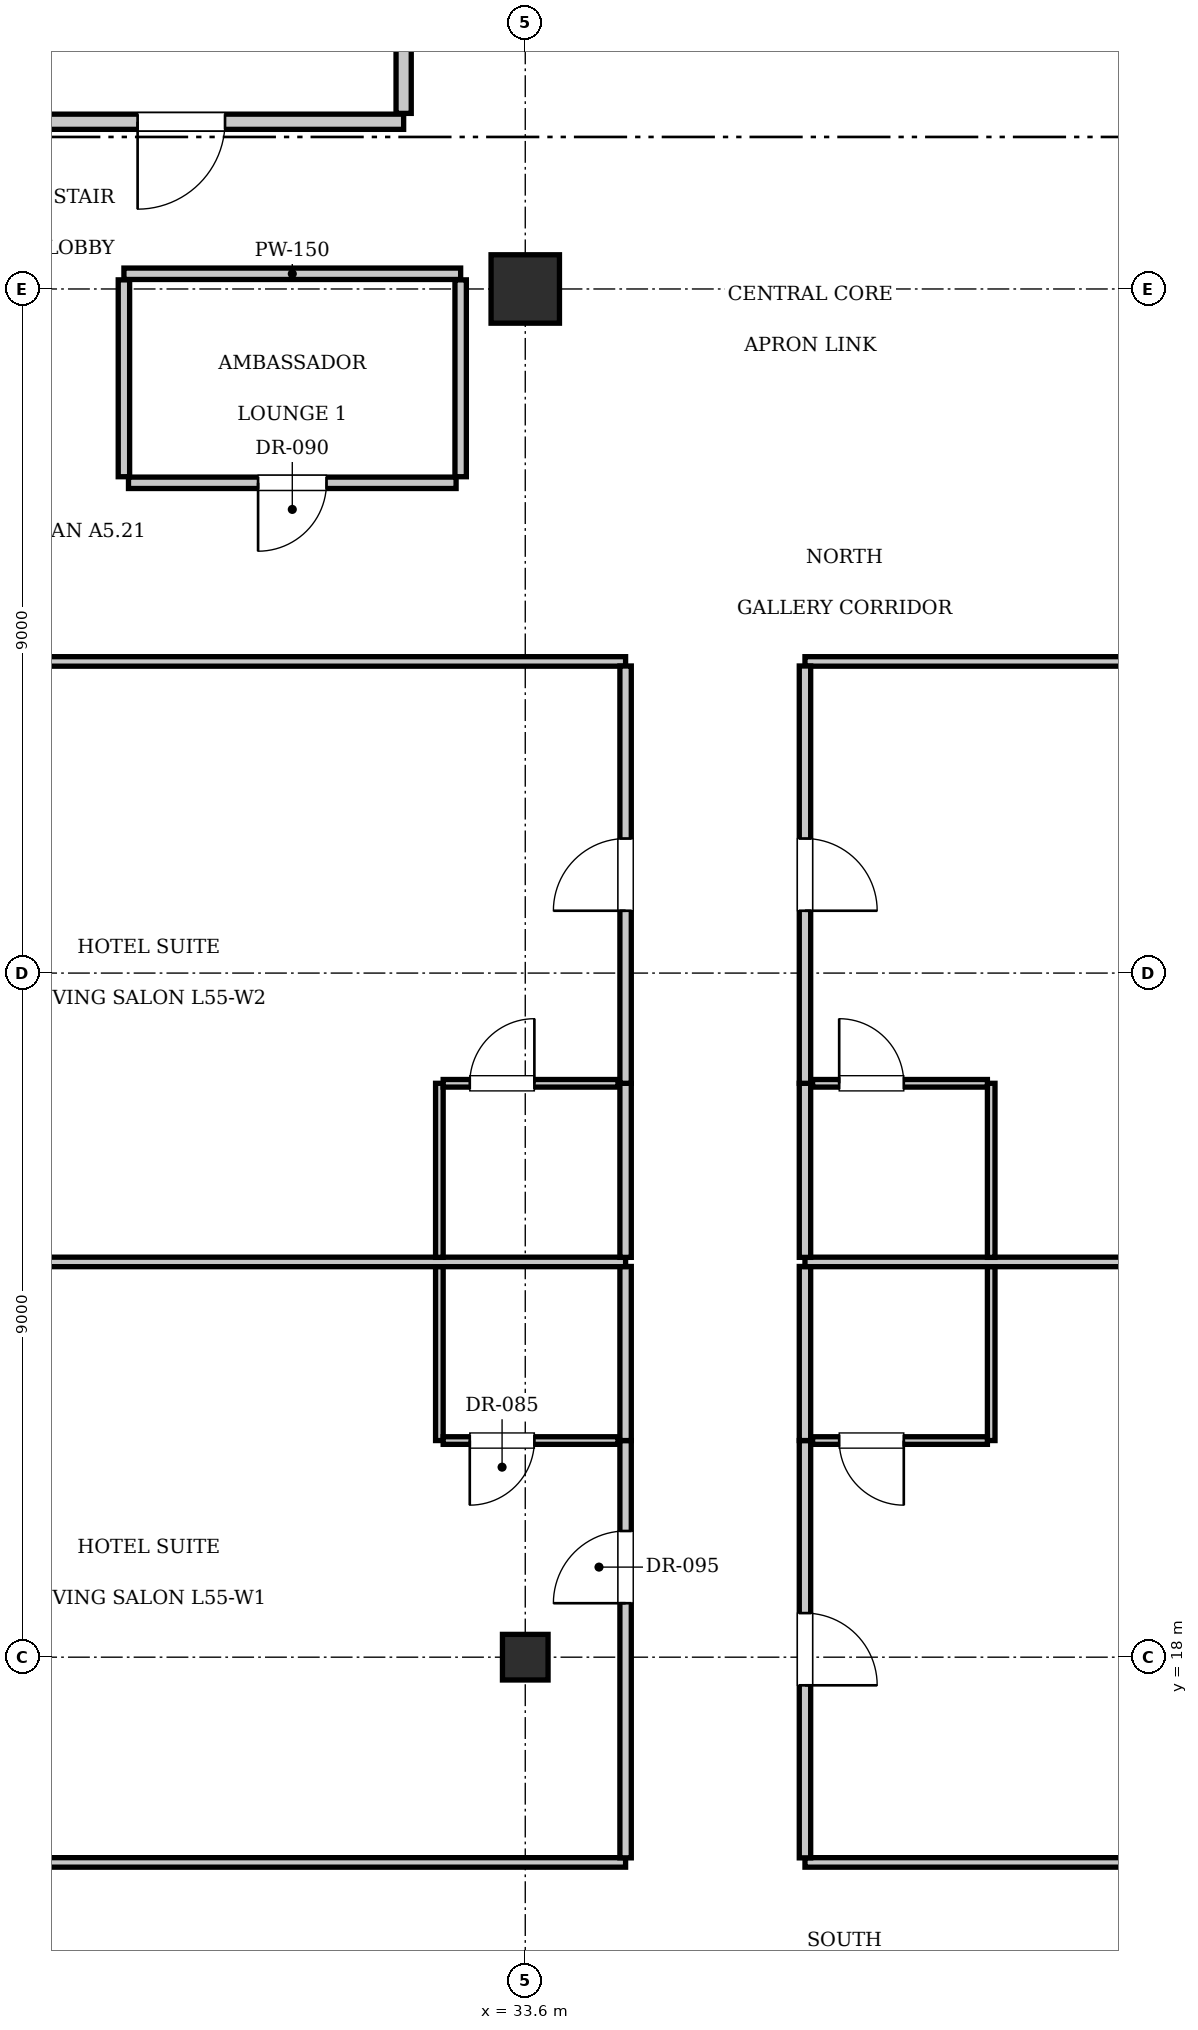
"""IFC4 building model, lengths in metres.
Left out: names, types, materials, properties, quantities, classifications, styles, units other than length and angle.
Written with IfcOpenShell. Run it as: python <this file> out.ifc"""

import sys

from ifc_helpers import new_model, si_unit, direction, frame, frame_2d, origin, origin_2d, place, context, subcontext, project, spatial, rectangle, i_section, extrude, element, fill, save


model = new_model("IFC4")
c1 = context("Model", 3, precision=1e-05, world=origin(), true_north=direction((0.0, 1.0)))
c2 = subcontext(c1, "Body", "Model", "MODEL_VIEW")
j1 = project(units=[si_unit("LENGTHUNIT", "METRE"), si_unit("PLANEANGLEUNIT", "RADIAN")], contexts=[c1])
p1 = place(None, origin())
s1 = spatial("IfcSite", under=j1, at=p1, CompositionType="ELEMENT")
p2 = place(p1, origin())
s2 = spatial("IfcBuilding", under=s1, at=p2, CompositionType="ELEMENT")
p3 = place(p2, frame((0.0, 0.0, 223.65)))
s3 = spatial("IfcBuildingStorey", under=s2, at=p3, CompositionType="ELEMENT", Elevation=223.65)
p4 = place(p3, frame((33.6, 36.0, 0.0), z_axis=(0.0, 0.0, 1.0), x_axis=(1.0, 0.0, 0.0)))
e1 = element("IfcColumn", 1, at=p4, inside=s3, PredefinedType="COLUMN", context=c2, shape_type="SweptSolid", body=[
    extrude(rectangle(XDim=0.9, YDim=0.9, at=origin_2d()), origin(), (0.0, 0.0, 1.0), 3.85),
])
p5 = place(p3, frame((33.6, 18.0, 0.0), z_axis=(0.0, 0.0, 1.0), x_axis=(1.0, 0.0, 0.0)))
e2 = element("IfcColumn", 2, at=p5, inside=s3, PredefinedType="COLUMN", context=c2, shape_type="SweptSolid", body=[
    extrude(i_section(OverallWidth=0.6, OverallDepth=0.6, WebThickness=0.025, FlangeThickness=0.038, at=origin_2d()), origin(), (0.0, 0.0, 1.0), 3.85),
])
p6 = place(p3, frame((26.2, 38.2, 0.0), z_axis=(0.0, 0.0, 1.0), x_axis=(1.0, 0.0, 0.0)))
e3 = element("IfcWall", 3, at=p6, inside=s3, PredefinedType="PARTITIONING", context=c2, shape_type="SweptSolid", body=[
    extrude(rectangle(XDim=5.8, YDim=0.2, at=frame_2d((2.9, 0.0))), origin(), (0.0, 0.0, 1.0), 3.55),
])
p7 = place(p6, frame((2.3, 0.0, 0.0)))
e4 = element("IfcOpeningElement", 4, at=p7, cuts=e3, PredefinedType="OPENING", context=c2, shape_type="SweptSolid", body=[
    extrude(rectangle(XDim=1.15, YDim=2.15, at=frame_2d((0.575, 1.075))), frame((0.0, 0.11, 0.0), z_axis=(0.0, -1.0, 0.0), x_axis=(1.0, 0.0, 0.0)), (0.0, 0.0, 1.0), 0.22),
])
p8 = place(p3, frame((32.0, 38.31, 0.0), z_axis=(0.0, 0.0, 1.0), x_axis=(0.0, 1.0, 0.0)))
e5 = element("IfcWall", 5, at=p8, inside=s3, PredefinedType="PARTITIONING", context=c2, shape_type="SweptSolid", body=[
    extrude(rectangle(XDim=3.07, YDim=0.2, at=frame_2d((1.535, 0.0))), origin(), (0.0, 0.0, 1.0), 3.55),
])
p9 = place(p3, frame((28.32, 36.2, 0.0), z_axis=(0.0, 0.0, 1.0), x_axis=(1.0, 0.0, 0.0)))
e6 = element("IfcWall", 6, at=p9, inside=s3, PredefinedType="PARTITIONING", context=c2, shape_type="SweptSolid", body=[
    extrude(rectangle(XDim=4.43, YDim=0.15, at=frame_2d((2.215, 0.0))), origin(), (0.0, 0.0, 1.0), 3.55),
])
for number, where, z_axis, x_axis in (
    (7, (28.32, 33.53, 0.0), (0.0, 0.0, 1.0), (0.0, 1.0, 0.0)),
    (8, (32.75, 33.53, 0.0), (0.0, 0.0, 1.0), (0.0, 1.0, 0.0)),
):
    element("IfcWall", number, at=place(p3, frame(where, z_axis=z_axis, x_axis=x_axis)), inside=s3, PredefinedType="PARTITIONING", context=c2, shape_type="SweptSolid", body=[
        extrude(rectangle(XDim=2.59, YDim=0.15, at=frame_2d((1.295, 0.0))), origin(), (0.0, 0.0, 1.0), 3.55),
    ])
p10 = place(p3, frame((28.38, 33.45, 0.0), z_axis=(0.0, 0.0, 1.0), x_axis=(1.0, 0.0, 0.0)))
e9 = element("IfcWall", 9, at=p10, inside=s3, PredefinedType="PARTITIONING", context=c2, shape_type="SweptSolid", body=[
    extrude(rectangle(XDim=4.31, YDim=0.15, at=frame_2d((2.155, 0.0))), origin(), (0.0, 0.0, 1.0), 3.55),
])
p11 = place(p10, frame((1.705, 0.0, 0.0)))
e10 = element("IfcOpeningElement", 10, at=p11, cuts=e9, PredefinedType="OPENING", context=c2, shape_type="SweptSolid", body=[
    extrude(rectangle(XDim=0.9, YDim=2.1, at=frame_2d((0.45, 1.05))), frame((0.0, 0.085, 0.0), z_axis=(0.0, -1.0, 0.0), x_axis=(1.0, 0.0, 0.0)), (0.0, 0.0, 1.0), 0.17),
])
p12 = place(p3, frame((13.2, 15.3, 0.0), z_axis=(0.0, 0.0, 1.0), x_axis=(1.0, 0.0, 0.0)))
e11 = element("IfcWall", 11, at=p12, inside=s3, PredefinedType="PARTITIONING", context=c2, shape_type="SweptSolid", body=[
    extrude(rectangle(XDim=21.72, YDim=0.125, at=frame_2d((10.86, 0.0))), origin(), (0.0, 0.0, 1.0), 3.55),
])
p13 = place(p3, frame((37.28, 15.3, 0.0), z_axis=(0.0, 0.0, 1.0), x_axis=(1.0, 0.0, 0.0)))
e12 = element("IfcWall", 12, at=p13, inside=s3, PredefinedType="PARTITIONING", context=c2, shape_type="SweptSolid", body=[
    extrude(rectangle(XDim=25.12, YDim=0.125, at=frame_2d((12.56, 0.0))), origin(), (0.0, 0.0, 1.0), 3.55),
])
p14 = place(p3, frame((13.2, 31.1, 0.0), z_axis=(0.0, 0.0, 1.0), x_axis=(1.0, 0.0, 0.0)))
e13 = element("IfcWall", 13, at=p14, inside=s3, PredefinedType="PARTITIONING", context=c2, shape_type="SweptSolid", body=[
    extrude(rectangle(XDim=21.72, YDim=0.125, at=frame_2d((10.86, 0.0))), origin(), (0.0, 0.0, 1.0), 3.55),
])
p15 = place(p3, frame((37.28, 31.1, 0.0), z_axis=(0.0, 0.0, 1.0), x_axis=(1.0, 0.0, 0.0)))
e14 = element("IfcWall", 14, at=p15, inside=s3, PredefinedType="PARTITIONING", context=c2, shape_type="SweptSolid", body=[
    extrude(rectangle(XDim=25.12, YDim=0.125, at=frame_2d((12.56, 0.0))), origin(), (0.0, 0.0, 1.0), 3.55),
])
p16 = place(p3, frame((34.92, 15.36, 0.0), z_axis=(0.0, 0.0, 1.0), x_axis=(0.0, 1.0, 0.0)))
e15 = element("IfcWall", 15, at=p16, inside=s3, PredefinedType="PARTITIONING", context=c2, shape_type="SweptSolid", body=[
    extrude(rectangle(XDim=5.49, YDim=0.15, at=frame_2d((2.745, 0.0))), origin(), (0.0, 0.0, 1.0), 3.55),
])
p17 = place(p16, frame((3.35, 0.0, 0.0)))
e16 = element("IfcOpeningElement", 16, at=p17, cuts=e15, PredefinedType="OPENING", context=c2, shape_type="SweptSolid", body=[
    extrude(rectangle(XDim=0.95, YDim=2.15, at=frame_2d((0.475, 1.075))), frame((0.0, 0.085, 0.0), z_axis=(0.0, -1.0, 0.0), x_axis=(1.0, 0.0, 0.0)), (0.0, 0.0, 1.0), 0.17),
])
p18 = place(p3, frame((34.92, 20.85, 0.0), z_axis=(0.0, 0.0, 1.0), x_axis=(0.0, 1.0, 0.0)))
e17 = element("IfcWall", 17, at=p18, inside=s3, PredefinedType="PARTITIONING", context=c2, shape_type="SweptSolid", body=[
    extrude(rectangle(XDim=2.29, YDim=0.15, at=frame_2d((1.145, 0.0))), origin(), (0.0, 0.0, 1.0), 3.55),
])
p19 = place(p3, frame((32.47, 20.85, 0.0), z_axis=(0.0, 0.0, 1.0), x_axis=(0.0, 1.0, 0.0)))
e18 = element("IfcWall", 18, at=p19, inside=s3, PredefinedType="PARTITIONING", context=c2, shape_type="SweptSolid", body=[
    extrude(rectangle(XDim=2.29, YDim=0.1, at=frame_2d((1.145, 0.0))), origin(), (0.0, 0.0, 1.0), 3.55),
])
p20 = place(p3, frame((32.52, 20.85, 0.0), z_axis=(0.0, 0.0, 1.0), x_axis=(1.0, 0.0, 0.0)))
e19 = element("IfcWall", 19, at=p20, inside=s3, PredefinedType="PARTITIONING", context=c2, shape_type="SweptSolid", body=[
    extrude(rectangle(XDim=2.3, YDim=0.1, at=frame_2d((1.15, 0.0))), origin(), (0.0, 0.0, 1.0), 3.55),
])
p21 = place(p20, frame((0.35, 0.0, 0.0)))
e20 = element("IfcOpeningElement", 20, at=p21, cuts=e19, PredefinedType="OPENING", context=c2, shape_type="SweptSolid", body=[
    extrude(rectangle(XDim=0.85, YDim=2.1, at=frame_2d((0.425, 1.05))), frame((0.0, 0.06, 0.0), z_axis=(0.0, -1.0, 0.0), x_axis=(1.0, 0.0, 0.0)), (0.0, 0.0, 1.0), 0.12),
])
p22 = place(p3, frame((37.28, 15.36, 0.0), z_axis=(0.0, 0.0, 1.0), x_axis=(0.0, 1.0, 0.0)))
e21 = element("IfcWall", 21, at=p22, inside=s3, PredefinedType="PARTITIONING", context=c2, shape_type="SweptSolid", body=[
    extrude(rectangle(XDim=5.49, YDim=0.15, at=frame_2d((2.745, 0.0))), origin(), (0.0, 0.0, 1.0), 3.55),
])
p23 = place(p22, frame((2.27, 0.0, 0.0)))
e22 = element("IfcOpeningElement", 22, at=p23, cuts=e21, PredefinedType="OPENING", context=c2, shape_type="SweptSolid", body=[
    extrude(rectangle(XDim=0.95, YDim=2.15, at=frame_2d((0.475, 1.075))), frame((0.0, 0.085, 0.0), z_axis=(0.0, -1.0, 0.0), x_axis=(1.0, 0.0, 0.0)), (0.0, 0.0, 1.0), 0.17),
])
p24 = place(p3, frame((37.28, 20.85, 0.0), z_axis=(0.0, 0.0, 1.0), x_axis=(0.0, 1.0, 0.0)))
e23 = element("IfcWall", 23, at=p24, inside=s3, PredefinedType="PARTITIONING", context=c2, shape_type="SweptSolid", body=[
    extrude(rectangle(XDim=2.29, YDim=0.15, at=frame_2d((1.145, 0.0))), origin(), (0.0, 0.0, 1.0), 3.55),
])
p25 = place(p3, frame((39.73, 20.85, 0.0), z_axis=(0.0, 0.0, 1.0), x_axis=(0.0, 1.0, 0.0)))
e24 = element("IfcWall", 24, at=p25, inside=s3, PredefinedType="PARTITIONING", context=c2, shape_type="SweptSolid", body=[
    extrude(rectangle(XDim=2.29, YDim=0.1, at=frame_2d((1.145, 0.0))), origin(), (0.0, 0.0, 1.0), 3.55),
])
p26 = place(p3, frame((37.38, 20.85, 0.0), z_axis=(0.0, 0.0, 1.0), x_axis=(1.0, 0.0, 0.0)))
e25 = element("IfcWall", 25, at=p26, inside=s3, PredefinedType="PARTITIONING", context=c2, shape_type="SweptSolid", body=[
    extrude(rectangle(XDim=2.3, YDim=0.1, at=frame_2d((1.15, 0.0))), origin(), (0.0, 0.0, 1.0), 3.55),
])
p27 = place(p26, frame((0.35, 0.0, 0.0)))
e26 = element("IfcOpeningElement", 26, at=p27, cuts=e25, PredefinedType="OPENING", context=c2, shape_type="SweptSolid", body=[
    extrude(rectangle(XDim=0.85, YDim=2.1, at=frame_2d((0.425, 1.05))), frame((0.0, 0.06, 0.0), z_axis=(0.0, -1.0, 0.0), x_axis=(1.0, 0.0, 0.0)), (0.0, 0.0, 1.0), 0.12),
])
p28 = place(p3, frame((13.2, 23.2, 0.0), z_axis=(0.0, 0.0, 1.0), x_axis=(1.0, 0.0, 0.0)))
e27 = element("IfcWall", 27, at=p28, inside=s3, PredefinedType="PARTITIONING", context=c2, shape_type="SweptSolid", body=[
    extrude(rectangle(XDim=21.72, YDim=0.125, at=frame_2d((10.86, 0.0))), origin(), (0.0, 0.0, 1.0), 3.55),
])
p29 = place(p3, frame((37.28, 23.2, 0.0), z_axis=(0.0, 0.0, 1.0), x_axis=(1.0, 0.0, 0.0)))
e28 = element("IfcWall", 28, at=p29, inside=s3, PredefinedType="PARTITIONING", context=c2, shape_type="SweptSolid", body=[
    extrude(rectangle(XDim=25.12, YDim=0.125, at=frame_2d((12.56, 0.0))), origin(), (0.0, 0.0, 1.0), 3.55),
])
p30 = place(p3, frame((34.92, 23.26, 0.0), z_axis=(0.0, 0.0, 1.0), x_axis=(0.0, 1.0, 0.0)))
e29 = element("IfcWall", 29, at=p30, inside=s3, PredefinedType="PARTITIONING", context=c2, shape_type="SweptSolid", body=[
    extrude(rectangle(XDim=2.29, YDim=0.15, at=frame_2d((1.145, 0.0))), origin(), (0.0, 0.0, 1.0), 3.55),
])
p31 = place(p3, frame((34.92, 25.55, 0.0), z_axis=(0.0, 0.0, 1.0), x_axis=(0.0, 1.0, 0.0)))
e30 = element("IfcWall", 30, at=p31, inside=s3, PredefinedType="PARTITIONING", context=c2, shape_type="SweptSolid", body=[
    extrude(rectangle(XDim=5.49, YDim=0.15, at=frame_2d((2.745, 0.0))), origin(), (0.0, 0.0, 1.0), 3.55),
])
p32 = place(p31, frame((2.27, 0.0, 0.0)))
e31 = element("IfcOpeningElement", 31, at=p32, cuts=e30, PredefinedType="OPENING", context=c2, shape_type="SweptSolid", body=[
    extrude(rectangle(XDim=0.95, YDim=2.15, at=frame_2d((0.475, 1.075))), frame((0.0, 0.085, 0.0), z_axis=(0.0, -1.0, 0.0), x_axis=(1.0, 0.0, 0.0)), (0.0, 0.0, 1.0), 0.17),
])
p33 = place(p3, frame((32.47, 23.26, 0.0), z_axis=(0.0, 0.0, 1.0), x_axis=(0.0, 1.0, 0.0)))
e32 = element("IfcWall", 32, at=p33, inside=s3, PredefinedType="PARTITIONING", context=c2, shape_type="SweptSolid", body=[
    extrude(rectangle(XDim=2.29, YDim=0.1, at=frame_2d((1.145, 0.0))), origin(), (0.0, 0.0, 1.0), 3.55),
])
p34 = place(p3, frame((32.52, 25.55, 0.0), z_axis=(0.0, 0.0, 1.0), x_axis=(1.0, 0.0, 0.0)))
e33 = element("IfcWall", 33, at=p34, inside=s3, PredefinedType="PARTITIONING", context=c2, shape_type="SweptSolid", body=[
    extrude(rectangle(XDim=2.3, YDim=0.1, at=frame_2d((1.15, 0.0))), origin(), (0.0, 0.0, 1.0), 3.55),
])
p35 = place(p34, frame((0.35, 0.0, 0.0)))
e34 = element("IfcOpeningElement", 34, at=p35, cuts=e33, PredefinedType="OPENING", context=c2, shape_type="SweptSolid", body=[
    extrude(rectangle(XDim=0.85, YDim=2.1, at=frame_2d((0.425, 1.05))), frame((0.0, 0.06, 0.0), z_axis=(0.0, -1.0, 0.0), x_axis=(1.0, 0.0, 0.0)), (0.0, 0.0, 1.0), 0.12),
])
p36 = place(p3, frame((37.28, 23.26, 0.0), z_axis=(0.0, 0.0, 1.0), x_axis=(0.0, 1.0, 0.0)))
e35 = element("IfcWall", 35, at=p36, inside=s3, PredefinedType="PARTITIONING", context=c2, shape_type="SweptSolid", body=[
    extrude(rectangle(XDim=2.29, YDim=0.15, at=frame_2d((1.145, 0.0))), origin(), (0.0, 0.0, 1.0), 3.55),
])
p37 = place(p3, frame((37.28, 25.55, 0.0), z_axis=(0.0, 0.0, 1.0), x_axis=(0.0, 1.0, 0.0)))
e36 = element("IfcWall", 36, at=p37, inside=s3, PredefinedType="PARTITIONING", context=c2, shape_type="SweptSolid", body=[
    extrude(rectangle(XDim=5.49, YDim=0.15, at=frame_2d((2.745, 0.0))), origin(), (0.0, 0.0, 1.0), 3.55),
])
p38 = place(p37, frame((2.27, 0.0, 0.0)))
e37 = element("IfcOpeningElement", 37, at=p38, cuts=e36, PredefinedType="OPENING", context=c2, shape_type="SweptSolid", body=[
    extrude(rectangle(XDim=0.95, YDim=2.15, at=frame_2d((0.475, 1.075))), frame((0.0, 0.085, 0.0), z_axis=(0.0, -1.0, 0.0), x_axis=(1.0, 0.0, 0.0)), (0.0, 0.0, 1.0), 0.17),
])
p39 = place(p3, frame((39.73, 23.26, 0.0), z_axis=(0.0, 0.0, 1.0), x_axis=(0.0, 1.0, 0.0)))
e38 = element("IfcWall", 38, at=p39, inside=s3, PredefinedType="PARTITIONING", context=c2, shape_type="SweptSolid", body=[
    extrude(rectangle(XDim=2.29, YDim=0.1, at=frame_2d((1.145, 0.0))), origin(), (0.0, 0.0, 1.0), 3.55),
])
p40 = place(p3, frame((37.38, 25.55, 0.0), z_axis=(0.0, 0.0, 1.0), x_axis=(1.0, 0.0, 0.0)))
e39 = element("IfcWall", 39, at=p40, inside=s3, PredefinedType="PARTITIONING", context=c2, shape_type="SweptSolid", body=[
    extrude(rectangle(XDim=2.3, YDim=0.1, at=frame_2d((1.15, 0.0))), origin(), (0.0, 0.0, 1.0), 3.55),
])
p41 = place(p40, frame((0.35, 0.0, 0.0)))
e40 = element("IfcOpeningElement", 40, at=p41, cuts=e39, PredefinedType="OPENING", context=c2, shape_type="SweptSolid", body=[
    extrude(rectangle(XDim=0.85, YDim=2.1, at=frame_2d((0.425, 1.05))), frame((0.0, 0.06, 0.0), z_axis=(0.0, -1.0, 0.0), x_axis=(1.0, 0.0, 0.0)), (0.0, 0.0, 1.0), 0.12),
])
p42 = place(p7, frame((1.15, 0.0, 0.0), z_axis=(0.0, 0.0, 1.0), x_axis=(-1.0, 0.0, 0.0)))
e41 = element("IfcDoor", 41, at=p42, inside=s3, OperationType="SINGLE_SWING_RIGHT", PredefinedType="DOOR", context=c2, shape_type="SweptSolid", body=[
    extrude(rectangle(XDim=1.15, YDim=2.15, at=frame_2d((0.575, 1.075))), frame((0.0, 0.025, 0.0), z_axis=(0.0, -1.0, 0.0), x_axis=(1.0, 0.0, 0.0)), (0.0, 0.0, 1.0), 0.05),
])
fill(e4, e41)
p43 = place(p11, frame((0.9, 0.0, 0.0), z_axis=(0.0, 0.0, 1.0), x_axis=(-1.0, 0.0, 0.0)))
e42 = element("IfcDoor", 42, at=p43, inside=s3, OperationType="SINGLE_SWING_RIGHT", PredefinedType="DOOR", context=c2, shape_type="SweptSolid", body=[
    extrude(rectangle(XDim=0.9, YDim=2.1, at=frame_2d((0.45, 1.05))), frame((0.0, 0.025, 0.0), z_axis=(0.0, -1.0, 0.0), x_axis=(1.0, 0.0, 0.0)), (0.0, 0.0, 1.0), 0.05),
])
fill(e10, e42)
p44 = place(p21, frame((0.85, 0.0, 0.0), z_axis=(0.0, 0.0, 1.0), x_axis=(-1.0, 0.0, 0.0)))
e43 = element("IfcDoor", 43, at=p44, inside=s3, OperationType="SINGLE_SWING_RIGHT", PredefinedType="DOOR", context=c2, shape_type="SweptSolid", body=[
    extrude(rectangle(XDim=0.85, YDim=2.1, at=frame_2d((0.425, 1.05))), frame((0.0, 0.025, 0.0), z_axis=(0.0, -1.0, 0.0), x_axis=(1.0, 0.0, 0.0)), (0.0, 0.0, 1.0), 0.05),
])
fill(e20, e43)
p45 = place(p17, origin())
e44 = element("IfcDoor", 44, at=p45, inside=s3, OperationType="SINGLE_SWING_LEFT", PredefinedType="DOOR", context=c2, shape_type="SweptSolid", body=[
    extrude(rectangle(XDim=0.95, YDim=2.15, at=frame_2d((0.475, 1.075))), frame((0.0, 0.025, 0.0), z_axis=(0.0, -1.0, 0.0), x_axis=(1.0, 0.0, 0.0)), (0.0, 0.0, 1.0), 0.05),
])
fill(e16, e44)
p46 = place(p27, frame((0.85, 0.0, 0.0), z_axis=(0.0, 0.0, 1.0), x_axis=(-1.0, 0.0, 0.0)))
e45 = element("IfcDoor", 45, at=p46, inside=s3, OperationType="SINGLE_SWING_LEFT", PredefinedType="DOOR", context=c2, shape_type="SweptSolid", body=[
    extrude(rectangle(XDim=0.85, YDim=2.1, at=frame_2d((0.425, 1.05))), frame((0.0, 0.025, 0.0), z_axis=(0.0, -1.0, 0.0), x_axis=(1.0, 0.0, 0.0)), (0.0, 0.0, 1.0), 0.05),
])
fill(e26, e45)
p47 = place(p23, frame((0.95, 0.0, 0.0), z_axis=(0.0, 0.0, 1.0), x_axis=(-1.0, 0.0, 0.0)))
e46 = element("IfcDoor", 46, at=p47, inside=s3, OperationType="SINGLE_SWING_RIGHT", PredefinedType="DOOR", context=c2, shape_type="SweptSolid", body=[
    extrude(rectangle(XDim=0.95, YDim=2.15, at=frame_2d((0.475, 1.075))), frame((0.0, 0.025, 0.0), z_axis=(0.0, -1.0, 0.0), x_axis=(1.0, 0.0, 0.0)), (0.0, 0.0, 1.0), 0.05),
])
fill(e22, e46)
p48 = place(p35, origin())
e47 = element("IfcDoor", 47, at=p48, inside=s3, OperationType="SINGLE_SWING_RIGHT", PredefinedType="DOOR", context=c2, shape_type="SweptSolid", body=[
    extrude(rectangle(XDim=0.85, YDim=2.1, at=frame_2d((0.425, 1.05))), frame((0.0, 0.025, 0.0), z_axis=(0.0, -1.0, 0.0), x_axis=(1.0, 0.0, 0.0)), (0.0, 0.0, 1.0), 0.05),
])
fill(e34, e47)
p49 = place(p32, origin())
e48 = element("IfcDoor", 48, at=p49, inside=s3, OperationType="SINGLE_SWING_LEFT", PredefinedType="DOOR", context=c2, shape_type="SweptSolid", body=[
    extrude(rectangle(XDim=0.95, YDim=2.15, at=frame_2d((0.475, 1.075))), frame((0.0, 0.025, 0.0), z_axis=(0.0, -1.0, 0.0), x_axis=(1.0, 0.0, 0.0)), (0.0, 0.0, 1.0), 0.05),
])
fill(e31, e48)
p50 = place(p41, origin())
e49 = element("IfcDoor", 49, at=p50, inside=s3, OperationType="SINGLE_SWING_LEFT", PredefinedType="DOOR", context=c2, shape_type="SweptSolid", body=[
    extrude(rectangle(XDim=0.85, YDim=2.1, at=frame_2d((0.425, 1.05))), frame((0.0, 0.025, 0.0), z_axis=(0.0, -1.0, 0.0), x_axis=(1.0, 0.0, 0.0)), (0.0, 0.0, 1.0), 0.05),
])
fill(e40, e49)
p51 = place(p38, frame((0.95, 0.0, 0.0), z_axis=(0.0, 0.0, 1.0), x_axis=(-1.0, 0.0, 0.0)))
e50 = element("IfcDoor", 50, at=p51, inside=s3, OperationType="SINGLE_SWING_RIGHT", PredefinedType="DOOR", context=c2, shape_type="SweptSolid", body=[
    extrude(rectangle(XDim=0.95, YDim=2.15, at=frame_2d((0.475, 1.075))), frame((0.0, 0.025, 0.0), z_axis=(0.0, -1.0, 0.0), x_axis=(1.0, 0.0, 0.0)), (0.0, 0.0, 1.0), 0.05),
])
fill(e37, e50)
save(model, sys.argv[1])
